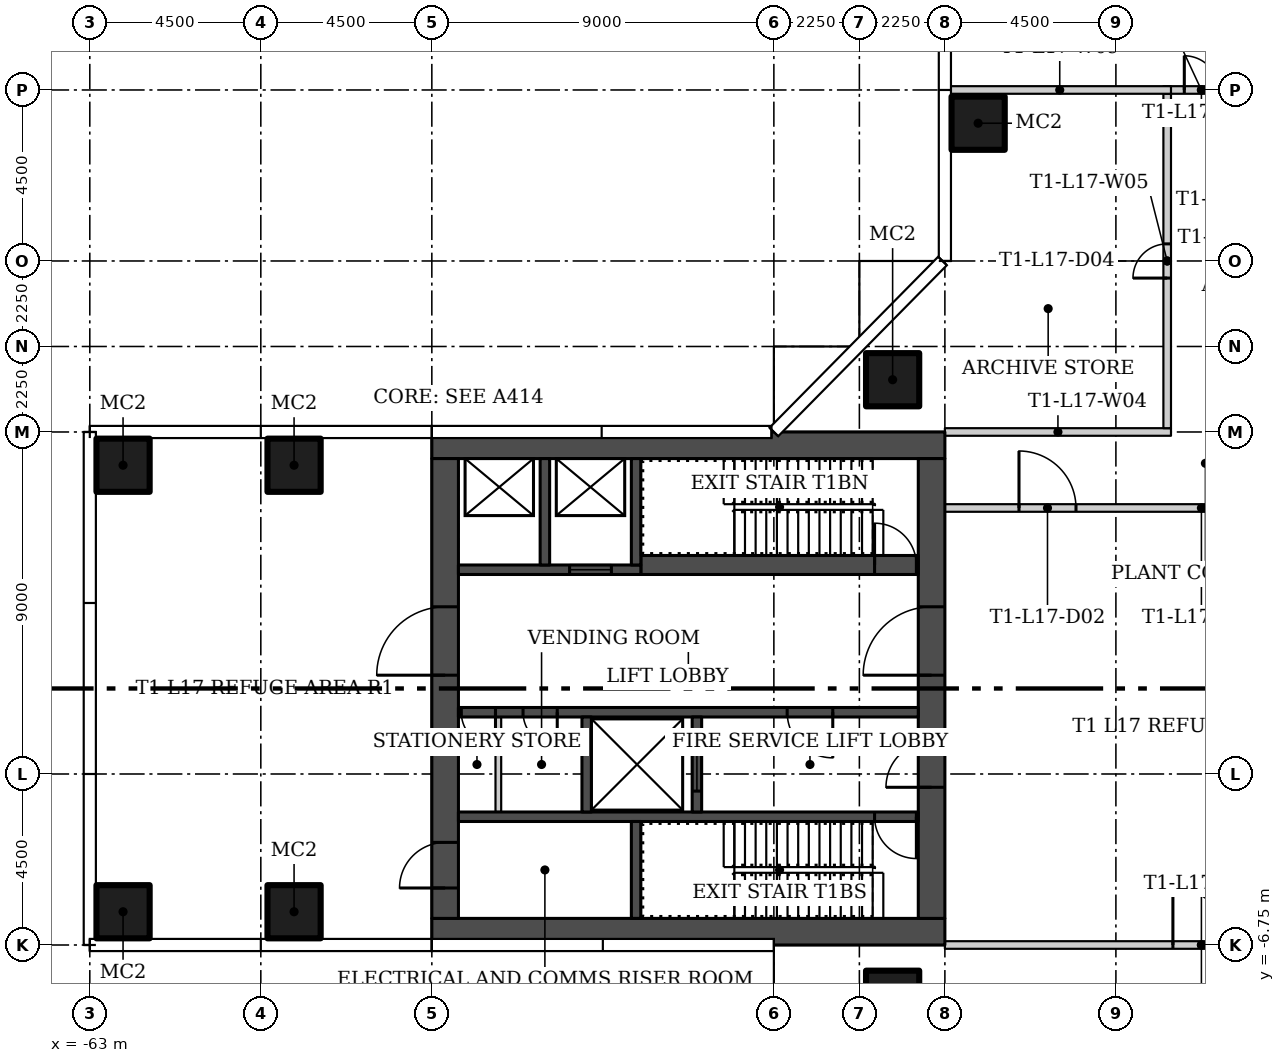
"""IFC4 building model, lengths in metres.
Left out: names, types, materials, properties, quantities, classifications, styles, units other than length and angle.
Written with IfcOpenShell. Run it as: python <this file> out.ifc"""

import sys

from ifc_helpers import new_model, si_unit, direction, frame, frame_2d, origin, origin_2d, place, context, subcontext, project, spatial, rectangle, hollow_rectangle, extrude, element, fill, save


model = new_model("IFC4")
c1 = context("Model", 3, precision=1e-05, world=origin(), true_north=direction((0.0, 1.0)))
c2 = subcontext(c1, "Body", "Model", "MODEL_VIEW")
j1 = project(units=[si_unit("LENGTHUNIT", "METRE"), si_unit("PLANEANGLEUNIT", "RADIAN")], contexts=[c1])
p1 = place(None, origin())
s1 = spatial("IfcSite", under=j1, at=p1, CompositionType="ELEMENT")
p2 = place(p1, origin())
s2 = spatial("IfcBuilding", under=s1, at=p2, CompositionType="ELEMENT")
p3 = place(p2, frame((0.0, 0.0, 77.1)))
s3 = spatial("IfcBuildingStorey", under=s2, at=p3, CompositionType="ELEMENT", Elevation=77.1)
for number, where in (
    (1, (-41.875, 8.125, 0.0)),
    (2, (-41.875, -8.125, 0.0)),
    (3, (-57.625, -5.875, 0.0)),
    (4, (-62.125, -5.875, 0.0)),
    (5, (-57.625, 5.875, 0.0)),
    (6, (-62.125, 5.875, 0.0)),
    (7, (-39.625, 14.875, 0.0)),
):
    element("IfcColumn", number, at=place(p3, frame(where)), inside=s3, PredefinedType="COLUMN", context=c2, shape_type="SweptSolid", body=[
        extrude(hollow_rectangle(XDim=1.4, YDim=1.4, WallThickness=0.05, at=origin_2d()), origin(), (0.0, 0.0, 1.0), 4.45),
    ])
p4 = place(p3, frame((-40.5, 4.75, 0.0)))
e8 = element("IfcWall", 8, at=p4, inside=s3, PredefinedType="PARTITIONING", context=c2, shape_type="SweptSolid", body=[
    extrude(rectangle(XDim=13.5, YDim=0.2, at=frame_2d((6.75, 0.0))), origin(), (0.0, 0.0, 1.0), 4.45),
])
p5 = place(p4, frame((1.95, 0.0, 0.0)))
e9 = element("IfcOpeningElement", 9, at=p5, cuts=e8, PredefinedType="OPENING", context=c2, shape_type="SweptSolid", body=[
    extrude(rectangle(XDim=1.5, YDim=2.4, at=frame_2d((0.75, 1.2))), frame((0.0, 0.11, 0.0), z_axis=(0.0, -1.0, 0.0), x_axis=(1.0, 0.0, 0.0)), (0.0, 0.0, 1.0), 0.22),
])
p6 = place(p4, frame((10.05, 0.0, 0.0)))
e10 = element("IfcOpeningElement", 10, at=p6, cuts=e8, PredefinedType="OPENING", context=c2, shape_type="SweptSolid", body=[
    extrude(rectangle(XDim=1.5, YDim=2.4, at=frame_2d((0.75, 1.2))), frame((0.0, 0.11, 0.0), z_axis=(0.0, -1.0, 0.0), x_axis=(1.0, 0.0, 0.0)), (0.0, 0.0, 1.0), 0.22),
])
p7 = place(p3, frame((-40.5, 6.75, 0.0)))
e11 = element("IfcWall", 11, at=p7, inside=s3, PredefinedType="PARTITIONING", context=c2, shape_type="SweptSolid", body=[
    extrude(rectangle(XDim=5.95, YDim=0.2, at=frame_2d((2.975, 0.0))), origin(), (0.0, 0.0, 1.0), 4.45),
])
p8 = place(p3, frame((-34.65, 6.85, 0.0), z_axis=(0.0, 0.0, 1.0), x_axis=(0.0, 1.0, 0.0)))
e12 = element("IfcWall", 12, at=p8, inside=s3, PredefinedType="PARTITIONING", context=c2, shape_type="SweptSolid", body=[
    extrude(rectangle(XDim=8.8, YDim=0.2, at=frame_2d((4.4, 0.0))), origin(), (0.0, 0.0, 1.0), 4.45),
])
p9 = place(p8, frame((3.95, 0.0, 0.0)))
e13 = element("IfcOpeningElement", 13, at=p9, cuts=e12, PredefinedType="OPENING", context=c2, shape_type="SweptSolid", body=[
    extrude(rectangle(XDim=0.9, YDim=2.1, at=frame_2d((0.45, 1.05))), frame((0.0, 0.11, 0.0), z_axis=(0.0, -1.0, 0.0), x_axis=(1.0, 0.0, 0.0)), (0.0, 0.0, 1.0), 0.22),
])
p10 = place(p3, frame((-34.75, 15.75, 0.0)))
e14 = element("IfcWall", 14, at=p10, inside=s3, PredefinedType="PARTITIONING", context=c2, shape_type="SweptSolid", body=[
    extrude(rectangle(XDim=2.001, YDim=0.2, at=frame_2d((1.0, 0.0))), origin(), (0.0, 0.0, 1.0), 4.45),
])
p11 = place(p10, frame((0.55, 0.0, 0.0)))
e15 = element("IfcOpeningElement", 15, at=p11, cuts=e14, PredefinedType="OPENING", context=c2, shape_type="SweptSolid", body=[
    extrude(rectangle(XDim=0.9, YDim=2.4, at=frame_2d((0.45, 1.2))), frame((0.0, 0.11, 0.0), z_axis=(0.0, -1.0, 0.0), x_axis=(1.0, 0.0, 0.0)), (0.0, 0.0, 1.0), 0.22),
])
p12 = place(p3, frame((-40.5, -6.75, 0.0)))
e16 = element("IfcWall", 16, at=p12, inside=s3, PredefinedType="PARTITIONING", context=c2, shape_type="SweptSolid", body=[
    extrude(rectangle(XDim=13.5, YDim=0.2, at=frame_2d((6.75, 0.0))), origin(), (0.0, 0.0, 1.0), 4.45),
])
p13 = place(p12, frame((6.0, 0.0, 0.0)))
e17 = element("IfcOpeningElement", 17, at=p13, cuts=e16, PredefinedType="OPENING", context=c2, shape_type="SweptSolid", body=[
    extrude(rectangle(XDim=1.5, YDim=2.4, at=frame_2d((0.75, 1.2))), frame((0.0, 0.11, 0.0), z_axis=(0.0, -1.0, 0.0), x_axis=(1.0, 0.0, 0.0)), (0.0, 0.0, 1.0), 0.22),
])
p14 = place(p3, frame((-34.55, 15.75, 0.0), z_axis=(0.0, 0.0, 1.0), x_axis=(-1.0, 0.0, 0.0)))
e18 = element("IfcWall", 18, at=p14, inside=s3, PredefinedType="PARTITIONING", context=c2, shape_type="SweptSolid", body=[
    extrude(rectangle(XDim=5.855, YDim=0.2, at=frame_2d((2.927, 0.0))), origin(), (0.0, 0.0, 1.0), 4.45),
])
for number, where, z_axis, x_axis in (
    (19, (-40.5, -6.4, 0.0), (0.0, 0.0, 1.0), (-1.0, 0.0, 0.0)),
    (20, (-40.5, 6.4, 0.0), (0.0, 0.0, 1.0), (-1.0, 0.0, 0.0)),
):
    element("IfcWall", number, at=place(p3, frame(where, z_axis=z_axis, x_axis=x_axis)), inside=s3, PredefinedType="SHEAR", context=c2, shape_type="SweptSolid", body=[
        extrude(rectangle(XDim=13.5, YDim=0.7, at=frame_2d((6.75, 0.0))), origin(), (0.0, 0.0, 1.0), 4.45),
    ])
p15 = place(p3, frame((-40.85, -6.05, 0.0), z_axis=(0.0, 0.0, 1.0), x_axis=(0.0, 1.0, 0.0)))
e21 = element("IfcWall", 21, at=p15, inside=s3, PredefinedType="SHEAR", context=c2, shape_type="SweptSolid", body=[
    extrude(rectangle(XDim=12.1, YDim=0.7, at=frame_2d((6.05, 0.0))), origin(), (0.0, 0.0, 1.0), 4.45),
])
p16 = place(p15, frame((3.45, 0.0, 0.0)))
e22 = element("IfcOpeningElement", 22, at=p16, cuts=e21, PredefinedType="OPENING", context=c2, shape_type="SweptSolid", body=[
    extrude(rectangle(XDim=1.2, YDim=2.1, at=frame_2d((0.6, 1.05))), frame((0.0, 0.36, 0.0), z_axis=(0.0, -1.0, 0.0), x_axis=(1.0, 0.0, 0.0)), (0.0, 0.0, 1.0), 0.72),
])
p17 = place(p15, frame((6.4, 0.0, 0.0)))
e23 = element("IfcOpeningElement", 23, at=p17, cuts=e21, PredefinedType="OPENING", context=c2, shape_type="SweptSolid", body=[
    extrude(rectangle(XDim=1.8, YDim=2.4, at=frame_2d((0.9, 1.2))), frame((0.0, 0.36, 0.0), z_axis=(0.0, -1.0, 0.0), x_axis=(1.0, 0.0, 0.0)), (0.0, 0.0, 1.0), 0.72),
])
p18 = place(p3, frame((-53.65, -6.05, 0.0), z_axis=(0.0, 0.0, 1.0), x_axis=(0.0, 1.0, 0.0)))
e24 = element("IfcWall", 24, at=p18, inside=s3, PredefinedType="SHEAR", context=c2, shape_type="SweptSolid", body=[
    extrude(rectangle(XDim=12.1, YDim=0.7, at=frame_2d((6.05, 0.0))), origin(), (0.0, 0.0, 1.0), 4.45),
])
p19 = place(p18, frame((0.8, 0.0, 0.0)))
e25 = element("IfcOpeningElement", 25, at=p19, cuts=e24, PredefinedType="OPENING", context=c2, shape_type="SweptSolid", body=[
    extrude(rectangle(XDim=1.2, YDim=2.1, at=frame_2d((0.6, 1.05))), frame((0.0, 0.36, 0.0), z_axis=(0.0, -1.0, 0.0), x_axis=(1.0, 0.0, 0.0)), (0.0, 0.0, 1.0), 0.72),
])
p20 = place(p18, frame((6.4, 0.0, 0.0)))
e26 = element("IfcOpeningElement", 26, at=p20, cuts=e24, PredefinedType="OPENING", context=c2, shape_type="SweptSolid", body=[
    extrude(rectangle(XDim=1.8, YDim=2.4, at=frame_2d((0.9, 1.2))), frame((0.0, 0.36, 0.0), z_axis=(0.0, -1.0, 0.0), x_axis=(1.0, 0.0, 0.0)), (0.0, 0.0, 1.0), 0.72),
])
p21 = place(p3, frame((-41.2, -3.375, 0.0), z_axis=(0.0, 0.0, 1.0), x_axis=(-1.0, 0.0, 0.0)))
e27 = element("IfcWall", 27, at=p21, inside=s3, PredefinedType="SHEAR", context=c2, shape_type="SweptSolid", body=[
    extrude(rectangle(XDim=12.1, YDim=0.25, at=frame_2d((6.05, 0.0))), origin(), (0.0, 0.0, 1.0), 4.45),
])
p22 = place(p21, frame((0.05, 0.0, 0.0)))
e28 = element("IfcOpeningElement", 28, at=p22, cuts=e27, PredefinedType="OPENING", context=c2, shape_type="SweptSolid", body=[
    extrude(rectangle(XDim=1.1, YDim=2.1, at=frame_2d((0.55, 1.05))), frame((0.0, 0.135, 0.0), z_axis=(0.0, -1.0, 0.0), x_axis=(1.0, 0.0, 0.0)), (0.0, 0.0, 1.0), 0.27),
])
p23 = place(p3, frame((-48.625, -6.05, 0.0), z_axis=(0.0, 0.0, 1.0), x_axis=(0.0, 1.0, 0.0)))
e29 = element("IfcWall", 29, at=p23, inside=s3, PredefinedType="SHEAR", context=c2, shape_type="SweptSolid", body=[
    extrude(rectangle(XDim=2.55, YDim=0.25, at=frame_2d((1.275, 0.0))), origin(), (0.0, 0.0, 1.0), 4.45),
])
p24 = place(p3, frame((-41.2, -0.625, 0.0), z_axis=(0.0, 0.0, 1.0), x_axis=(-1.0, 0.0, 0.0)))
e30 = element("IfcWall", 30, at=p24, inside=s3, PredefinedType="SHEAR", context=c2, shape_type="SweptSolid", body=[
    extrude(rectangle(XDim=12.1, YDim=0.25, at=frame_2d((6.05, 0.0))), origin(), (0.0, 0.0, 1.0), 4.45),
])
p25 = place(p24, frame((2.25, 0.0, 0.0)))
e31 = element("IfcOpeningElement", 31, at=p25, cuts=e30, PredefinedType="OPENING", context=c2, shape_type="SweptSolid", body=[
    extrude(rectangle(XDim=1.2, YDim=2.1, at=frame_2d((0.6, 1.05))), frame((0.0, 0.135, 0.0), z_axis=(0.0, -1.0, 0.0), x_axis=(1.0, 0.0, 0.0)), (0.0, 0.0, 1.0), 0.27),
])
p26 = place(p24, frame((9.5, 0.0, 0.0)))
e32 = element("IfcOpeningElement", 32, at=p26, cuts=e30, PredefinedType="OPENING", context=c2, shape_type="SweptSolid", body=[
    extrude(rectangle(XDim=0.9, YDim=2.1, at=frame_2d((0.45, 1.05))), frame((0.0, 0.135, 0.0), z_axis=(0.0, -1.0, 0.0), x_axis=(1.0, 0.0, 0.0)), (0.0, 0.0, 1.0), 0.27),
])
p27 = place(p24, frame((11.125, 0.0, 0.0)))
e33 = element("IfcOpeningElement", 33, at=p27, cuts=e30, PredefinedType="OPENING", context=c2, shape_type="SweptSolid", body=[
    extrude(rectangle(XDim=0.9, YDim=2.1, at=frame_2d((0.45, 1.05))), frame((0.0, 0.135, 0.0), z_axis=(0.0, -1.0, 0.0), x_axis=(1.0, 0.0, 0.0)), (0.0, 0.0, 1.0), 0.27),
])
p28 = place(p3, frame((-47.025, -3.25, 0.0), z_axis=(0.0, 0.0, 1.0), x_axis=(0.0, 1.0, 0.0)))
e34 = element("IfcWall", 34, at=p28, inside=s3, PredefinedType="SHEAR", context=c2, shape_type="SweptSolid", body=[
    extrude(rectangle(XDim=2.5, YDim=0.25, at=frame_2d((1.25, 0.0))), origin(), (0.0, 0.0, 1.0), 4.45),
])
p29 = place(p28, frame((0.55, 0.0, 0.0)))
e35 = element("IfcOpeningElement", 35, at=p29, cuts=e34, PredefinedType="OPENING", context=c2, shape_type="SweptSolid", body=[
    extrude(rectangle(XDim=1.4, YDim=2.4, at=frame_2d((0.7, 1.2))), frame((0.0, 0.135, 0.0), z_axis=(0.0, -1.0, 0.0), x_axis=(1.0, 0.0, 0.0)), (0.0, 0.0, 1.0), 0.27),
])
p30 = place(p3, frame((-49.925, -3.25, 0.0), z_axis=(0.0, 0.0, 1.0), x_axis=(0.0, 1.0, 0.0)))
e36 = element("IfcWall", 36, at=p30, inside=s3, PredefinedType="SHEAR", context=c2, shape_type="SweptSolid", body=[
    extrude(rectangle(XDim=2.5, YDim=0.25, at=frame_2d((1.25, 0.0))), origin(), (0.0, 0.0, 1.0), 4.45),
])
p31 = place(p3, frame((-52.25, -3.25, 0.0), z_axis=(0.0, 0.0, 1.0), x_axis=(0.0, 1.0, 0.0)))
e37 = element("IfcWall", 37, at=p31, inside=s3, PredefinedType="PARTITIONING", context=c2, shape_type="SweptSolid", body=[
    extrude(rectangle(XDim=2.5, YDim=0.15, at=frame_2d((1.25, 0.0))), origin(), (0.0, 0.0, 1.0), 4.45),
])
p32 = place(p3, frame((-48.5, 3.25, 0.0)))
e38 = element("IfcWall", 38, at=p32, inside=s3, PredefinedType="SHEAR", context=c2, shape_type="SweptSolid", body=[
    extrude(rectangle(XDim=7.3, YDim=0.5, at=frame_2d((3.65, 0.0))), origin(), (0.0, 0.0, 1.0), 4.45),
])
p33 = place(p32, frame((6.15, 0.0, 0.0)))
e39 = element("IfcOpeningElement", 39, at=p33, cuts=e38, PredefinedType="OPENING", context=c2, shape_type="SweptSolid", body=[
    extrude(rectangle(XDim=1.1, YDim=2.1, at=frame_2d((0.55, 1.05))), frame((0.0, 0.26, 0.0), z_axis=(0.0, -1.0, 0.0), x_axis=(1.0, 0.0, 0.0)), (0.0, 0.0, 1.0), 0.52),
])
p34 = place(p3, frame((-48.5, 3.125, 0.0), z_axis=(0.0, 0.0, 1.0), x_axis=(-1.0, 0.0, 0.0)))
e40 = element("IfcWall", 40, at=p34, inside=s3, PredefinedType="SHEAR", context=c2, shape_type="SweptSolid", body=[
    extrude(rectangle(XDim=4.8, YDim=0.25, at=frame_2d((2.4, 0.0))), origin(), (0.0, 0.0, 1.0), 4.45),
])
p35 = place(p34, frame((0.775, 0.0, 0.0)))
e41 = element("IfcOpeningElement", 41, at=p35, cuts=e40, PredefinedType="OPENING", context=c2, shape_type="SweptSolid", body=[
    extrude(rectangle(XDim=1.1, YDim=2.1, at=frame_2d((0.55, 1.05))), frame((0.0, 0.135, 0.0), z_axis=(0.0, -1.0, 0.0), x_axis=(1.0, 0.0, 0.0)), (0.0, 0.0, 1.0), 0.27),
])
for number, where, z_axis, x_axis in (
    (42, (-48.625, 3.25, 0.0), (0.0, 0.0, 1.0), (0.0, 1.0, 0.0)),
    (43, (-51.025, 3.25, 0.0), (0.0, 0.0, 1.0), (0.0, 1.0, 0.0)),
):
    element("IfcWall", number, at=place(p3, frame(where, z_axis=z_axis, x_axis=x_axis)), inside=s3, PredefinedType="SHEAR", context=c2, shape_type="SweptSolid", body=[
        extrude(rectangle(XDim=2.8, YDim=0.25, at=frame_2d((1.4, 0.0))), origin(), (0.0, 0.0, 1.0), 4.45),
    ])
p36 = place(p13, origin())
e44 = element("IfcDoor", 44, at=p36, inside=s3, OperationType="DOUBLE_DOOR_SINGLE_SWING", PredefinedType="DOOR", context=c2, shape_type="SweptSolid", body=[
    extrude(rectangle(XDim=1.5, YDim=2.4, at=frame_2d((0.75, 1.2))), frame((0.0, 0.025, 0.0), z_axis=(0.0, -1.0, 0.0), x_axis=(1.0, 0.0, 0.0)), (0.0, 0.0, 1.0), 0.05),
])
fill(e17, e44)
p37 = place(p5, origin())
e45 = element("IfcDoor", 45, at=p37, inside=s3, OperationType="DOUBLE_DOOR_SINGLE_SWING", PredefinedType="DOOR", context=c2, shape_type="SweptSolid", body=[
    extrude(rectangle(XDim=1.5, YDim=2.4, at=frame_2d((0.75, 1.2))), frame((0.0, 0.025, 0.0), z_axis=(0.0, -1.0, 0.0), x_axis=(1.0, 0.0, 0.0)), (0.0, 0.0, 1.0), 0.05),
])
fill(e9, e45)
p38 = place(p9, origin())
e46 = element("IfcDoor", 46, at=p38, inside=s3, OperationType="SINGLE_SWING_LEFT", PredefinedType="DOOR", context=c2, shape_type="SweptSolid", body=[
    extrude(rectangle(XDim=0.9, YDim=2.1, at=frame_2d((0.45, 1.05))), frame((0.0, 0.025, 0.0), z_axis=(0.0, -1.0, 0.0), x_axis=(1.0, 0.0, 0.0)), (0.0, 0.0, 1.0), 0.05),
])
fill(e13, e46)
p39 = place(p11, origin())
e47 = element("IfcDoor", 47, at=p39, inside=s3, OperationType="SINGLE_SWING_RIGHT", PredefinedType="DOOR", context=c2, shape_type="SweptSolid", body=[
    extrude(rectangle(XDim=0.9, YDim=2.4, at=frame_2d((0.45, 1.2))), frame((0.0, 0.025, 0.0), z_axis=(0.0, -1.0, 0.0), x_axis=(1.0, 0.0, 0.0)), (0.0, 0.0, 1.0), 0.05),
])
fill(e15, e47)
p40 = place(p16, origin())
e48 = element("IfcDoor", 48, at=p40, inside=s3, OperationType="SINGLE_SWING_LEFT", PredefinedType="DOOR", context=c2, shape_type="SweptSolid", body=[
    extrude(rectangle(XDim=1.2, YDim=2.1, at=frame_2d((0.6, 1.05))), frame((0.0, 0.025, 0.0), z_axis=(0.0, -1.0, 0.0), x_axis=(1.0, 0.0, 0.0)), (0.0, 0.0, 1.0), 0.05),
])
fill(e22, e48)
p41 = place(p17, origin())
e49 = element("IfcDoor", 49, at=p41, inside=s3, OperationType="DOUBLE_DOOR_SINGLE_SWING", PredefinedType="DOOR", context=c2, shape_type="SweptSolid", body=[
    extrude(rectangle(XDim=1.8, YDim=2.4, at=frame_2d((0.9, 1.2))), frame((0.0, 0.025, 0.0), z_axis=(0.0, -1.0, 0.0), x_axis=(1.0, 0.0, 0.0)), (0.0, 0.0, 1.0), 0.05),
])
fill(e23, e49)
p42 = place(p19, origin())
e50 = element("IfcDoor", 50, at=p42, inside=s3, OperationType="SINGLE_SWING_LEFT", PredefinedType="DOOR", context=c2, shape_type="SweptSolid", body=[
    extrude(rectangle(XDim=1.2, YDim=2.1, at=frame_2d((0.6, 1.05))), frame((0.0, 0.025, 0.0), z_axis=(0.0, -1.0, 0.0), x_axis=(1.0, 0.0, 0.0)), (0.0, 0.0, 1.0), 0.05),
])
fill(e25, e50)
p43 = place(p20, origin())
e51 = element("IfcDoor", 51, at=p43, inside=s3, OperationType="DOUBLE_DOOR_SINGLE_SWING", PredefinedType="DOOR", context=c2, shape_type="SweptSolid", body=[
    extrude(rectangle(XDim=1.8, YDim=2.4, at=frame_2d((0.9, 1.2))), frame((0.0, 0.025, 0.0), z_axis=(0.0, -1.0, 0.0), x_axis=(1.0, 0.0, 0.0)), (0.0, 0.0, 1.0), 0.05),
])
fill(e26, e51)
p44 = place(p22, origin())
e52 = element("IfcDoor", 52, at=p44, inside=s3, OperationType="SINGLE_SWING_LEFT", PredefinedType="DOOR", context=c2, shape_type="SweptSolid", body=[
    extrude(rectangle(XDim=1.1, YDim=2.1, at=frame_2d((0.55, 1.05))), frame((0.0, 0.025, 0.0), z_axis=(0.0, -1.0, 0.0), x_axis=(1.0, 0.0, 0.0)), (0.0, 0.0, 1.0), 0.05),
])
fill(e28, e52)
p45 = place(p25, origin())
e53 = element("IfcDoor", 53, at=p45, inside=s3, OperationType="SINGLE_SWING_LEFT", PredefinedType="DOOR", context=c2, shape_type="SweptSolid", body=[
    extrude(rectangle(XDim=1.2, YDim=2.1, at=frame_2d((0.6, 1.05))), frame((0.0, 0.025, 0.0), z_axis=(0.0, -1.0, 0.0), x_axis=(1.0, 0.0, 0.0)), (0.0, 0.0, 1.0), 0.05),
])
fill(e31, e53)
p46 = place(p26, origin())
e54 = element("IfcDoor", 54, at=p46, inside=s3, OperationType="SINGLE_SWING_RIGHT", PredefinedType="DOOR", context=c2, shape_type="SweptSolid", body=[
    extrude(rectangle(XDim=0.9, YDim=2.1, at=frame_2d((0.45, 1.05))), frame((0.0, 0.025, 0.0), z_axis=(0.0, -1.0, 0.0), x_axis=(1.0, 0.0, 0.0)), (0.0, 0.0, 1.0), 0.05),
])
fill(e32, e54)
p47 = place(p27, origin())
e55 = element("IfcDoor", 55, at=p47, inside=s3, OperationType="SINGLE_SWING_RIGHT", PredefinedType="DOOR", context=c2, shape_type="SweptSolid", body=[
    extrude(rectangle(XDim=0.9, YDim=2.1, at=frame_2d((0.45, 1.05))), frame((0.0, 0.025, 0.0), z_axis=(0.0, -1.0, 0.0), x_axis=(1.0, 0.0, 0.0)), (0.0, 0.0, 1.0), 0.05),
])
fill(e33, e55)
p48 = place(p29, origin())
e56 = element("IfcDoor", 56, at=p48, inside=s3, OperationType="SLIDING_TO_LEFT", PredefinedType="DOOR", context=c2, shape_type="SweptSolid", body=[
    extrude(rectangle(XDim=1.4, YDim=2.4, at=frame_2d((0.7, 1.2))), frame((0.0, 0.025, 0.0), z_axis=(0.0, -1.0, 0.0), x_axis=(1.0, 0.0, 0.0)), (0.0, 0.0, 1.0), 0.05),
])
fill(e35, e56)
p49 = place(p33, origin())
e57 = element("IfcDoor", 57, at=p49, inside=s3, OperationType="SINGLE_SWING_RIGHT", PredefinedType="DOOR", context=c2, shape_type="SweptSolid", body=[
    extrude(rectangle(XDim=1.1, YDim=2.1, at=frame_2d((0.55, 1.05))), frame((0.0, 0.025, 0.0), z_axis=(0.0, -1.0, 0.0), x_axis=(1.0, 0.0, 0.0)), (0.0, 0.0, 1.0), 0.05),
])
fill(e39, e57)
p50 = place(p35, origin())
e58 = element("IfcDoor", 58, at=p50, inside=s3, OperationType="SLIDING_TO_LEFT", PredefinedType="DOOR", context=c2, shape_type="SweptSolid", body=[
    extrude(rectangle(XDim=1.1, YDim=2.1, at=frame_2d((0.55, 1.05))), frame((0.0, 0.025, 0.0), z_axis=(0.0, -1.0, 0.0), x_axis=(1.0, 0.0, 0.0)), (0.0, 0.0, 1.0), 0.05),
])
fill(e41, e58)
save(model, sys.argv[1])
